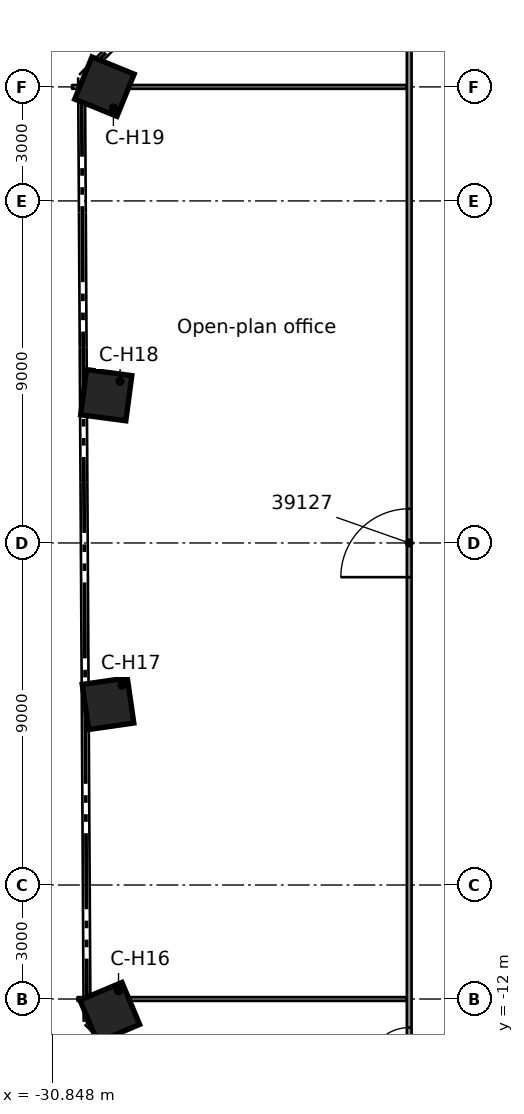
"""IFC4 building model, lengths in metres.
Left out: names, types, materials, properties, quantities, classifications, styles, units other than length and angle.
Written with IfcOpenShell. Run it as: python <this file> out.ifc"""

import sys

from ifc_helpers import new_model, si_unit, direction, frame, frame_2d, origin, origin_2d, place, context, subcontext, project, spatial, rectangle, extrude, element, fill, save


model = new_model("IFC4")
c1 = context("Model", 3, precision=1e-05, world=origin(), true_north=direction((0.0, 1.0)))
c2 = subcontext(c1, "Body", "Model", "MODEL_VIEW")
j1 = project(units=[si_unit("LENGTHUNIT", "METRE"), si_unit("PLANEANGLEUNIT", "RADIAN")], contexts=[c1])
p1 = place(None, origin())
s1 = spatial("IfcSite", under=j1, at=p1, CompositionType="ELEMENT")
p2 = place(p1, origin())
s2 = spatial("IfcBuilding", under=s1, at=p2, CompositionType="ELEMENT")
p3 = place(p2, frame((0.0, 0.0, 192.1)))
s3 = spatial("IfcBuildingStorey", under=s2, at=p3, CompositionType="ELEMENT", Elevation=192.1)
for number, where, z_axis, x_axis in (
    (1, (-29.329, -12.349, 0.0), (0.0, 0.0, 1.0), (-0.922, -0.388, 0.0)),
    (2, (-29.376, -4.23, 0.0), (0.0, 0.0, 1.0), (-0.99, -0.143, 0.0)),
    (3, (-29.423, 3.888, 0.0), (0.0, 0.0, 1.0), (-0.991, 0.131, 0.0)),
    (4, (-29.47, 12.007, 0.0), (0.0, 0.0, 1.0), (-0.926, 0.377, 0.0)),
):
    element("IfcColumn", number, at=place(p3, frame(where, z_axis=z_axis, x_axis=x_axis)), inside=s3, PredefinedType="COLUMN", context=c2, shape_type="SweptSolid", body=[
        extrude(rectangle(XDim=1.2, YDim=1.2, at=origin_2d()), origin(), (0.0, 0.0, 1.0), 3.5),
    ])
p4 = place(p3, frame((-30.18, -12.0, 0.0), z_axis=(0.0, 0.0, 1.0), x_axis=(1.0, 0.0, 0.0)))
e5 = element("IfcWall", 5, at=p4, inside=s3, PredefinedType="PARTITIONING", context=c2, shape_type="SweptSolid", body=[
    extrude(rectangle(XDim=8.668, YDim=0.1, at=frame_2d((4.334, 0.0))), origin(), (0.0, 0.0, 1.0), 3.06),
])
p5 = place(p3, frame((-30.321, 12.0, 0.0), z_axis=(0.0, 0.0, 1.0), x_axis=(1.0, 0.0, 0.0)))
e6 = element("IfcWall", 6, at=p5, inside=s3, PredefinedType="PARTITIONING", context=c2, shape_type="SweptSolid", body=[
    extrude(rectangle(XDim=8.809, YDim=0.1, at=frame_2d((4.405, 0.0))), origin(), (0.0, 0.0, 1.0), 3.06),
])
p6 = place(p3, frame((-21.45, -14.451, 0.0), z_axis=(0.0, 0.0, 1.0), x_axis=(0.0, 1.0, 0.0)))
e7 = element("IfcWall", 7, at=p6, inside=s3, PredefinedType="PARTITIONING", context=c2, shape_type="SweptSolid", body=[
    extrude(rectangle(XDim=28.902, YDim=0.125, at=frame_2d((14.451, 0.0))), origin(), (0.0, 0.0, 1.0), 3.06),
])
p7 = place(p6, frame((0.6, 0.0, 0.0)))
e8 = element("IfcOpeningElement", 8, at=p7, cuts=e7, PredefinedType="OPENING", context=c2, shape_type="SweptSolid", body=[
    extrude(rectangle(XDim=1.1, YDim=2.1, at=frame_2d((0.55, 1.05))), frame((0.0, 0.073, 0.0), z_axis=(0.0, -1.0, 0.0), x_axis=(1.0, 0.0, 0.0)), (0.0, 0.0, 1.0), 0.145),
])
p8 = place(p6, frame((13.551, 0.0, 0.0)))
e9 = element("IfcOpeningElement", 9, at=p8, cuts=e7, PredefinedType="OPENING", context=c2, shape_type="SweptSolid", body=[
    extrude(rectangle(XDim=1.8, YDim=2.1, at=frame_2d((0.9, 1.05))), frame((0.0, 0.073, 0.0), z_axis=(0.0, -1.0, 0.0), x_axis=(1.0, 0.0, 0.0)), (0.0, 0.0, 1.0), 0.145),
])
p9 = place(p7, origin())
e10 = element("IfcDoor", 10, at=p9, inside=s3, OperationType="SINGLE_SWING_LEFT", PredefinedType="DOOR", context=c2, shape_type="SweptSolid", body=[
    extrude(rectangle(XDim=1.1, YDim=2.1, at=frame_2d((0.55, 1.05))), frame((0.0, 0.025, 0.0), z_axis=(0.0, -1.0, 0.0), x_axis=(1.0, 0.0, 0.0)), (0.0, 0.0, 1.0), 0.05),
])
fill(e8, e10)
p10 = place(p8, origin())
e11 = element("IfcDoor", 11, at=p10, inside=s3, OperationType="DOUBLE_DOOR_SINGLE_SWING", PredefinedType="DOOR", context=c2, shape_type="SweptSolid", body=[
    extrude(rectangle(XDim=1.8, YDim=2.1, at=frame_2d((0.9, 1.05))), frame((0.0, 0.025, 0.0), z_axis=(0.0, -1.0, 0.0), x_axis=(1.0, 0.0, 0.0)), (0.0, 0.0, 1.0), 0.05),
])
fill(e9, e11)
save(model, sys.argv[1])
